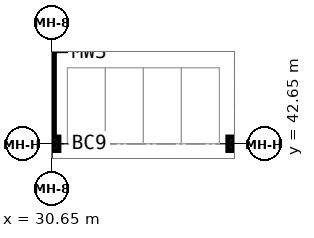
"""IFC4 building model, lengths in metres.
Left out: names, types, materials, properties, quantities, classifications, styles, units other than length and angle.
Written with IfcOpenShell. Run it as: python <this file> out.ifc"""

import sys

from ifc_helpers import new_model, si_unit, direction, frame, frame_2d, origin, origin_2d, place, context, subcontext, project, spatial, rectangle, extrude, source, transform, mapped, element, save


model = new_model("IFC4")
c1 = context("Model", 3, precision=1e-05, world=origin(), true_north=direction((0.0, 1.0)))
c2 = subcontext(c1, "Body", "Model", "MODEL_VIEW")
j1 = project(units=[si_unit("LENGTHUNIT", "METRE"), si_unit("PLANEANGLEUNIT", "RADIAN")], contexts=[c1])
p1 = place(None, origin())
s1 = spatial("IfcSite", under=j1, at=p1, CompositionType="ELEMENT")
p2 = place(p1, origin())
s2 = spatial("IfcBuilding", under=s1, at=p2, CompositionType="ELEMENT")
p3 = place(p2, frame((0.0, 0.0, -4.5)))
s3 = spatial("IfcBuildingStorey", under=s2, at=p3, CompositionType="ELEMENT", Elevation=-4.5)
m1 = source(origin(), c2, "Body", "SweptSolid", [
    extrude(rectangle(XDim=11.1, YDim=0.3, at=frame_2d((5.55, 0.0))), origin(), (0.0, 0.0, 1.0), 4.09),
])
p4 = place(p3, frame((30.65, 54.2, 0.0), z_axis=(0.0, 0.0, 1.0), x_axis=(0.0, -1.0, 0.0)))
e1 = element("IfcWall", 1, at=p4, inside=s3, PredefinedType="SHEAR", context=c2, shape_type="MappedRepresentation", body=[
    mapped(m1, transform((0.0, 0.0, 0.0))),
])
m2 = source(origin(), c2, "Body", "SweptSolid", [
    extrude(rectangle(XDim=0.9, YDim=0.9, at=origin_2d()), origin(), (0.0, 0.0, 1.0), 4.5),
])
for number, where, z_axis, x_axis in (
    (2, (30.65, 42.65, 0.0), (0.0, 0.0, 1.0), (1.0, 0.0, 0.0)),
    (3, (42.65, 42.65, 0.0), (0.0, 0.0, 1.0), (1.0, 0.0, 0.0)),
):
    element("IfcColumn", number, at=place(p3, frame(where, z_axis=z_axis, x_axis=x_axis)), inside=s3, PredefinedType="COLUMN", context=c2, shape_type="MappedRepresentation", body=[
        mapped(m2, transform((0.0, 0.0, 0.0))),
    ])
save(model, sys.argv[1])
